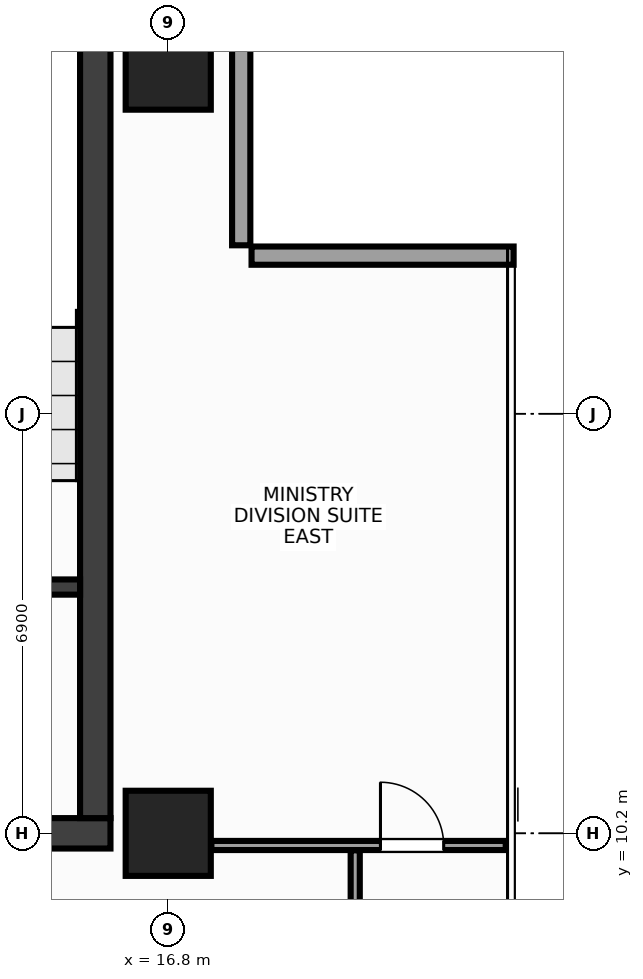
"""IFC4 building model, lengths in metres.
Left out: names, types, materials, properties, quantities, classifications, styles, units other than length and angle.
Written with IfcOpenShell. Run it as: python <this file> out.ifc"""

import sys

from ifc_helpers import new_model, si_unit, direction, frame, frame_2d, origin, origin_2d, place, context, subcontext, project, spatial, rectangle, extrude, source, transform, mapped, element, fill, save


model = new_model("IFC4")
c1 = context("Model", 3, precision=1e-05, world=origin(), true_north=direction((0.0, 1.0)))
c2 = subcontext(c1, "Body", "Model", "MODEL_VIEW")
j1 = project(units=[si_unit("LENGTHUNIT", "METRE"), si_unit("PLANEANGLEUNIT", "RADIAN")], contexts=[c1])
p1 = place(None, origin())
s1 = spatial("IfcSite", under=j1, at=p1, CompositionType="ELEMENT")
p2 = place(p1, origin())
s2 = spatial("IfcBuilding", under=s1, at=p2, CompositionType="ELEMENT")
p3 = place(p2, frame((0.0, 0.0, 246.8)))
s3 = spatial("IfcBuildingStorey", under=s2, at=p3, CompositionType="ELEMENT", Elevation=246.8)
m1 = source(origin(), c2, "Body", "SweptSolid", [
    extrude(rectangle(XDim=31.7, YDim=0.5, at=frame_2d((15.85, 0.0))), origin(), (0.0, 0.0, 1.0), 3.6),
])
p4 = place(p3, frame((-15.85, 10.2, 0.0), z_axis=(0.0, 0.0, 1.0), x_axis=(1.0, 0.0, 0.0)))
e1 = element("IfcWall", 1, at=p4, inside=s3, PredefinedType="SHEAR", context=c2, shape_type="MappedRepresentation", body=[
    mapped(m1, transform((0.0, 0.0, 0.0), x_axis=(1.0, 0.0, 0.0), y_axis=(0.0, 1.0, 0.0), z_axis=(0.0, 0.0, 1.0), scale=1.0)),
])
p5 = place(p4, frame((1.7, 0.0, 0.0)))
e2 = element("IfcOpeningElement", 2, at=p5, cuts=e1, PredefinedType="OPENING", context=c2, shape_type="SweptSolid", body=[
    extrude(rectangle(XDim=1.6, YDim=2.15, at=frame_2d((0.8, 1.075))), frame((0.0, 0.262, 0.0), z_axis=(0.0, -1.0, 0.0), x_axis=(1.0, 0.0, 0.0)), (0.0, 0.0, 1.0), 0.524),
])
p6 = place(p4, frame((28.4, 0.0, 0.0)))
e3 = element("IfcOpeningElement", 3, at=p6, cuts=e1, PredefinedType="OPENING", context=c2, shape_type="SweptSolid", body=[
    extrude(rectangle(XDim=1.6, YDim=2.15, at=frame_2d((0.8, 1.075))), frame((0.0, 0.262, 0.0), z_axis=(0.0, -1.0, 0.0), x_axis=(1.0, 0.0, 0.0)), (0.0, 0.0, 1.0), 0.524),
])
p7 = place(p4, frame((15.1, 0.0, 0.0)))
e4 = element("IfcOpeningElement", 4, at=p7, cuts=e1, PredefinedType="OPENING", context=c2, shape_type="SweptSolid", body=[
    extrude(rectangle(XDim=1.5, YDim=2.2, at=frame_2d((0.75, 1.1))), frame((0.0, 0.262, 0.0), z_axis=(0.0, -1.0, 0.0), x_axis=(1.0, 0.0, 0.0)), (0.0, 0.0, 1.0), 0.524),
])
m2 = source(origin(), c2, "Body", "SweptSolid", [
    extrude(rectangle(XDim=13.1, YDim=0.5, at=frame_2d((6.55, 0.0))), origin(), (0.0, 0.0, 1.0), 3.6),
])
p8 = place(p3, frame((15.6, 10.45, 0.0), z_axis=(0.0, 0.0, 1.0), x_axis=(0.0, 1.0, 0.0)))
e5 = element("IfcWall", 5, at=p8, inside=s3, PredefinedType="SHEAR", context=c2, shape_type="MappedRepresentation", body=[
    mapped(m2, transform((0.0, 0.0, 0.0), x_axis=(1.0, 0.0, 0.0), y_axis=(0.0, 1.0, 0.0), z_axis=(0.0, 0.0, 1.0), scale=1.0)),
])
m3 = source(origin(), c2, "Body", "SweptSolid", [
    extrude(rectangle(XDim=3.705, YDim=0.25, at=frame_2d((1.853, 0.0))), origin(), (0.0, 0.0, 1.0), 3.6),
])
p9 = place(p3, frame((11.645, 14.25, 0.0), z_axis=(0.0, 0.0, 1.0), x_axis=(1.0, 0.0, 0.0)))
e6 = element("IfcWall", 6, at=p9, inside=s3, PredefinedType="SHEAR", context=c2, shape_type="MappedRepresentation", body=[
    mapped(m3, transform((0.0, 0.0, 0.0), x_axis=(1.0, 0.0, 0.0), y_axis=(0.0, 1.0, 0.0), z_axis=(0.0, 0.0, 1.0), scale=1.0)),
])
p10 = place(p9, frame((0.95, 0.0, 0.0)))
e7 = element("IfcOpeningElement", 7, at=p10, cuts=e6, PredefinedType="OPENING", context=c2, shape_type="SweptSolid", body=[
    extrude(rectangle(XDim=1.6, YDim=2.15, at=frame_2d((0.8, 1.075))), frame((0.0, 0.137, 0.0), z_axis=(0.0, -1.0, 0.0), x_axis=(1.0, 0.0, 0.0)), (0.0, 0.0, 1.0), 0.274),
])
m4 = source(origin(), c2, "Body", "SweptSolid", [
    extrude(rectangle(XDim=1.4, YDim=1.4, at=origin_2d()), origin(), (0.0, 0.0, 1.0), 3.6),
])
for number, where, z_axis, x_axis in (
    (8, (16.8, 10.2, 0.0), (0.0, 0.0, 1.0), (1.0, 0.0, 0.0)),
    (9, (16.8, 22.8, 0.0), (0.0, 0.0, 1.0), (1.0, 0.0, 0.0)),
):
    element("IfcColumn", number, at=place(p3, frame(where, z_axis=z_axis, x_axis=x_axis)), inside=s3, PredefinedType="COLUMN", context=c2, shape_type="MappedRepresentation", body=[
        mapped(m4, transform((0.0, 0.0, 0.0), x_axis=(1.0, 0.0, 0.0), y_axis=(0.0, 1.0, 0.0), z_axis=(0.0, 0.0, 1.0), scale=1.0)),
    ])
m5 = source(origin(), c2, "Body", "SweptSolid", [
    extrude(rectangle(XDim=4.31, YDim=0.3, at=frame_2d((2.155, 0.0))), origin(), (0.0, 0.0, 1.0), 2.75),
])
p11 = place(p3, frame((22.48, 19.7, 0.0), z_axis=(0.0, 0.0, 1.0), x_axis=(-1.0, 0.0, 0.0)))
e10 = element("IfcWall", 10, at=p11, inside=s3, PredefinedType="STANDARD", context=c2, shape_type="MappedRepresentation", body=[
    mapped(m5, transform((0.0, 0.0, 0.0), x_axis=(1.0, 0.0, 0.0), y_axis=(0.0, 1.0, 0.0), z_axis=(0.0, 0.0, 1.0), scale=1.0)),
])
m6 = source(origin(), c2, "Body", "SweptSolid", [
    extrude(rectangle(XDim=4.31, YDim=0.3, at=frame_2d((2.155, 0.0))), origin(), (0.0, 0.0, 1.0), 2.75),
])
p12 = place(p3, frame((18.0, 19.87, 0.0), z_axis=(0.0, 0.0, 1.0), x_axis=(0.0, 1.0, 0.0)))
e11 = element("IfcWall", 11, at=p12, inside=s3, PredefinedType="STANDARD", context=c2, shape_type="MappedRepresentation", body=[
    mapped(m6, transform((0.0, 0.0, 0.0), x_axis=(1.0, 0.0, 0.0), y_axis=(0.0, 1.0, 0.0), z_axis=(0.0, 0.0, 1.0), scale=1.0)),
])
m7 = source(origin(), c2, "Body", "SweptSolid", [
    extrude(rectangle(XDim=4.84, YDim=0.15, at=frame_2d((2.42, 0.0))), origin(), (0.0, 0.0, 1.0), 3.37),
])
p13 = place(p3, frame((17.51, 10.0, 0.0), z_axis=(0.0, 0.0, 1.0), x_axis=(1.0, 0.0, 0.0)))
e12 = element("IfcWall", 12, at=p13, inside=s3, PredefinedType="PARTITIONING", context=c2, shape_type="MappedRepresentation", body=[
    mapped(m7, transform((0.0, 0.0, 0.0), x_axis=(1.0, 0.0, 0.0), y_axis=(0.0, 1.0, 0.0), z_axis=(0.0, 0.0, 1.0), scale=1.0)),
])
p14 = place(p13, frame((2.78, 0.0, 0.0)))
e13 = element("IfcOpeningElement", 13, at=p14, cuts=e12, PredefinedType="OPENING", context=c2, shape_type="SweptSolid", body=[
    extrude(rectangle(XDim=1.04, YDim=2.2, at=frame_2d((0.52, 1.1))), frame((0.0, 0.087, 0.0), z_axis=(0.0, -1.0, 0.0), x_axis=(1.0, 0.0, 0.0)), (0.0, 0.0, 1.0), 0.174),
])
m8 = source(origin(), c2, "Body", "SweptSolid", [
    extrude(rectangle(XDim=2.115, YDim=0.15, at=frame_2d((1.058, 0.0))), origin(), (0.0, 0.0, 1.0), 3.37),
])
p15 = place(p3, frame((19.875, 7.805, 0.0), z_axis=(0.0, 0.0, 1.0), x_axis=(0.0, 1.0, 0.0)))
e14 = element("IfcWall", 14, at=p15, inside=s3, PredefinedType="PARTITIONING", context=c2, shape_type="MappedRepresentation", body=[
    mapped(m8, transform((0.0, 0.0, 0.0), x_axis=(1.0, 0.0, 0.0), y_axis=(0.0, 1.0, 0.0), z_axis=(0.0, 0.0, 1.0), scale=1.0)),
])
m9 = source(origin(), c2, "Body", "SweptSolid", [
    extrude(rectangle(XDim=1.04, YDim=2.2, at=frame_2d((0.52, 1.1))), frame((0.0, 0.025, 0.0), z_axis=(0.0, -1.0, 0.0), x_axis=(1.0, 0.0, 0.0)), (0.0, 0.0, 1.0), 0.05),
])
p16 = place(p14, origin())
e15 = element("IfcDoor", 15, at=p16, inside=s3, OperationType="SINGLE_SWING_LEFT", PredefinedType="DOOR", context=c2, shape_type="MappedRepresentation", body=[
    mapped(m9, transform((0.0, 0.0, 0.0), x_axis=(1.0, 0.0, 0.0), y_axis=(0.0, 1.0, 0.0), z_axis=(0.0, 0.0, 1.0), scale=1.0)),
])
fill(e13, e15)
save(model, sys.argv[1])
